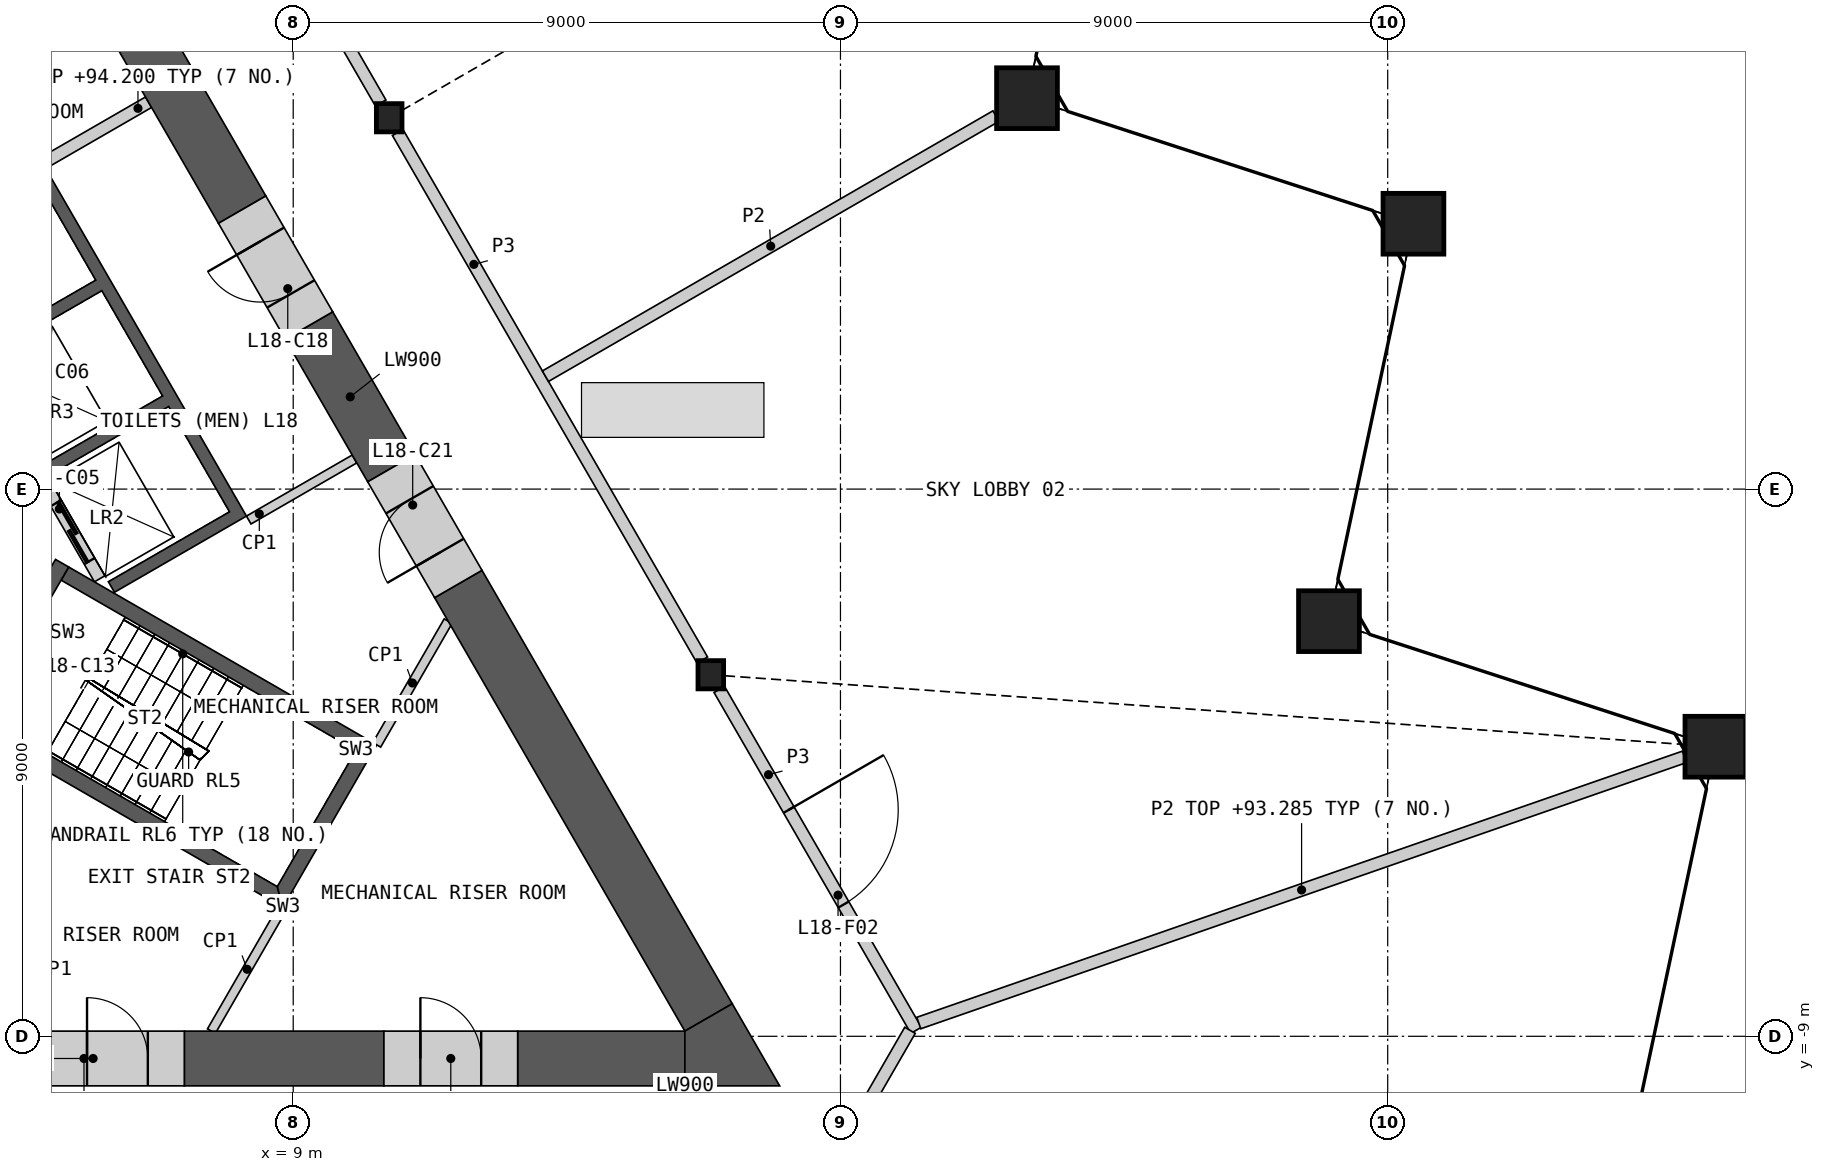
"""IFC4 building model, lengths in metres.
Left out: names, types, materials, properties, quantities, classifications, styles, units other than length and angle.
Written with IfcOpenShell. Run it as: python <this file> out.ifc"""

import sys

from ifc_helpers import new_model, si_unit, direction, frame, frame_2d, origin, origin_2d, place, context, subcontext, project, spatial, polyline, rectangle, hollow_rectangle, i_section, outline, extrude, element, fill, save


model = new_model("IFC4")
c1 = context("Model", 3, precision=1e-05, world=origin(), true_north=direction((0.0, 1.0)))
c2 = subcontext(c1, "Body", "Model", "MODEL_VIEW")
j1 = project(units=[si_unit("LENGTHUNIT", "METRE"), si_unit("PLANEANGLEUNIT", "RADIAN")], contexts=[c1])
p1 = place(None, origin())
s1 = spatial("IfcSite", under=j1, at=p1, CompositionType="ELEMENT")
p2 = place(p1, origin())
s2 = spatial("IfcBuilding", under=s1, at=p2, CompositionType="ELEMENT")
p3 = place(p2, frame((0.0, 0.0, 84.6)))
s3 = spatial("IfcBuildingStorey", under=s2, at=p3, CompositionType="ELEMENT", Elevation=84.6)
for number, where, z_axis, x_axis in (
    (1, (32.389, -4.237, 0.0), (0.0, 0.0, 1.0), (1.0, 0.0, 0.0)),
    (2, (26.034, -2.172, 0.0), (0.0, 0.0, 1.0), (1.0, 0.0, 0.0)),
    (3, (27.423, 4.364, 0.0), (0.0, 0.0, 1.0), (1.0, 0.0, 0.0)),
    (4, (21.068, 6.429, 0.0), (0.0, 0.0, 1.0), (1.0, 0.0, 0.0)),
):
    element("IfcColumn", number, at=place(p3, frame(where, z_axis=z_axis, x_axis=x_axis)), inside=s3, PredefinedType="COLUMN", context=c2, shape_type="SweptSolid", body=[
        extrude(hollow_rectangle(XDim=1.0, YDim=1.0, WallThickness=0.07, at=origin_2d()), origin(), (0.0, 0.0, 1.0), 10.0),
    ])
for number, where, z_axis, x_axis in (
    (5, (15.868, -3.054, 0.0), (0.0, 0.0, 1.0), (1.0, 0.0, 0.0)),
    (6, (10.578, 6.107, 0.0), (0.0, 0.0, 1.0), (1.0, 0.0, 0.0)),
):
    element("IfcColumn", number, at=place(p3, frame(where, z_axis=z_axis, x_axis=x_axis)), inside=s3, PredefinedType="COLUMN", context=c2, shape_type="SweptSolid", body=[
        extrude(i_section(OverallWidth=0.421, OverallDepth=0.465, WebThickness=0.045, FlangeThickness=0.072, at=origin_2d()), origin(), (0.0, 0.0, 1.0), 10.0),
    ])
p4 = place(p3, origin())
e7 = element("IfcWall", 7, at=p4, inside=s3, PredefinedType="SHEAR", context=c2, shape_type="SweptSolid", body=[
    extrude(outline(polyline([(2.66, 4.192), (4.831, 5.445), (8.231, -0.444), (6.061, -1.697), (5.96, -1.524), (7.952, -0.374), (6.952, 1.358), (4.96, 0.208), (4.861, 0.381), (6.852, 1.531), (5.852, 3.263), (3.861, 2.113), (3.76, 2.287), (5.752, 3.437), (4.752, 5.169), (2.76, 4.019), (2.66, 4.192)])), origin(), (0.0, 0.0, 1.0), 9.6),
])
p5 = place(p3, frame((5.817, -1.476, 0.0), z_axis=(0.0, 0.0, 1.0), x_axis=(-0.500002616675, 0.866023893041, 0.0)))
e8 = element("IfcWall", 8, at=p5, inside=s3, PredefinedType="SOLIDWALL", context=c2, shape_type="SweptSolid", body=[
    extrude(rectangle(XDim=8.373, YDim=0.2, at=frame_2d((4.187, 0.0))), origin(), (0.0, 0.0, 1.0), 9.6),
])
p6 = place(p5, frame((0.337, 0.0, 0.0)))
e9 = element("IfcOpeningElement", 9, at=p6, cuts=e8, PredefinedType="OPENING", context=c2, shape_type="SweptSolid", body=[
    extrude(rectangle(XDim=1.1, YDim=2.1, at=frame_2d((0.55, 1.05))), frame((0.0, 0.11, 0.0), z_axis=(0.0, -1.0, 0.0), x_axis=(1.0, 0.0, 0.0)), (0.0, 0.0, 1.0), 0.22),
])
p7 = place(p5, frame((2.537, 0.0, 0.0)))
e10 = element("IfcOpeningElement", 10, at=p7, cuts=e8, PredefinedType="OPENING", context=c2, shape_type="SweptSolid", body=[
    extrude(rectangle(XDim=1.1, YDim=2.1, at=frame_2d((0.55, 1.05))), frame((0.0, 0.11, 0.0), z_axis=(0.0, -1.0, 0.0), x_axis=(1.0, 0.0, 0.0)), (0.0, 0.0, 1.0), 0.22),
])
p8 = place(p5, frame((4.737, 0.0, 0.0)))
e11 = element("IfcOpeningElement", 11, at=p8, cuts=e8, PredefinedType="OPENING", context=c2, shape_type="SweptSolid", body=[
    extrude(rectangle(XDim=1.1, YDim=2.1, at=frame_2d((0.55, 1.05))), frame((0.0, 0.11, 0.0), z_axis=(0.0, -1.0, 0.0), x_axis=(1.0, 0.0, 0.0)), (0.0, 0.0, 1.0), 0.22),
])
p9 = place(p5, frame((7.037, 0.0, 0.0)))
e12 = element("IfcOpeningElement", 12, at=p9, cuts=e8, PredefinedType="OPENING", context=c2, shape_type="SweptSolid", body=[
    extrude(rectangle(XDim=0.9, YDim=2.1, at=frame_2d((0.45, 1.05))), frame((0.0, 0.11, 0.0), z_axis=(0.0, -1.0, 0.0), x_axis=(1.0, 0.0, 0.0)), (0.0, 0.0, 1.0), 0.22),
])
p10 = place(p3, frame((4.881, 5.358, 0.0), z_axis=(0.0, 0.0, 1.0), x_axis=(0.866035824272, 0.499981950752, 0.0)))
e13 = element("IfcWall", 13, at=p10, inside=s3, PredefinedType="SHEAR", context=c2, shape_type="SweptSolid", body=[
    extrude(rectangle(XDim=2.009, YDim=0.2, at=frame_2d((1.004, 0.0))), origin(), (0.0, 0.0, 1.0), 9.6),
])
p11 = place(p3, frame((3.781, 7.263, 0.0), z_axis=(0.0, 0.0, 1.0), x_axis=(0.865983199114, 0.50007309351, 0.0)))
e14 = element("IfcWall", 14, at=p11, inside=s3, PredefinedType="SHEAR", context=c2, shape_type="SweptSolid", body=[
    extrude(rectangle(XDim=2.009, YDim=0.2, at=frame_2d((1.004, 0.0))), origin(), (0.0, 0.0, 1.0), 9.6),
])
p12 = place(p3, origin())
e15 = element("IfcWall", 15, at=p12, inside=s3, PredefinedType="SHEAR", context=c2, shape_type="SweptSolid", body=[
    extrude(outline(polyline([(3.763, -3.956), (8.83, -6.881), (8.738, -6.539), (3.888, -3.739), (3.763, -3.956)])), origin(), (0.0, 0.0, 1.0), 9.6),
])
p13 = place(p3, origin())
e16 = element("IfcWall", 16, at=p13, inside=s3, PredefinedType="SHEAR", context=c2, shape_type="SweptSolid", body=[
    extrude(outline(polyline([(8.83, -6.881), (10.374, -4.206), (10.032, -4.298), (8.738, -6.539), (8.83, -6.881)])), origin(), (0.0, 0.0, 1.0), 9.6),
])
p14 = place(p3, origin())
e17 = element("IfcWall", 17, at=p14, inside=s3, PredefinedType="SHEAR", context=c2, shape_type="SweptSolid", body=[
    extrude(outline(polyline([(10.032, -4.298), (10.374, -4.206), (5.307, -1.281), (5.182, -1.498), (10.032, -4.298)])), origin(), (0.0, 0.0, 1.0), 9.6),
])
p15 = place(p3, frame((3.655, -3.893, 0.0), z_axis=(0.0, 0.0, 1.0), x_axis=(0.499982516597, 0.866035497597, 0.0)))
e18 = element("IfcWall", 18, at=p15, inside=s3, PredefinedType="SHEAR", context=c2, shape_type="SweptSolid", body=[
    extrude(rectangle(XDim=3.088, YDim=0.25, at=frame_2d((1.544, 0.0))), origin(), (0.0, 0.0, 1.0), 9.6),
])
p16 = place(p15, frame((0.994, 0.0, 0.0)))
e19 = element("IfcOpeningElement", 19, at=p16, cuts=e18, PredefinedType="OPENING", context=c2, shape_type="SweptSolid", body=[
    extrude(rectangle(XDim=1.1, YDim=2.1, at=frame_2d((0.55, 1.05))), frame((0.0, 0.135, 0.0), z_axis=(0.0, -1.0, 0.0), x_axis=(1.0, 0.0, 0.0)), (0.0, 0.0, 1.0), 0.27),
])
p17 = place(p3, frame((8.268, -0.509, 0.0), z_axis=(0.0, 0.0, 1.0), x_axis=(0.866035824272, 0.499981950752, 0.0)))
e20 = element("IfcWall", 20, at=p17, inside=s3, PredefinedType="PARTITIONING", context=c2, shape_type="SweptSolid", body=[
    extrude(rectangle(XDim=2.009, YDim=0.15, at=frame_2d((1.004, 0.0))), origin(), (0.0, 0.0, 1.0), 9.6),
])
p18 = place(p3, frame((8.83, -6.881, 0.0), z_axis=(0.0, 0.0, 1.0), x_axis=(-0.500073279432, -0.865983091751, 0.0)))
e21 = element("IfcWall", 21, at=p18, inside=s3, PredefinedType="PARTITIONING", context=c2, shape_type="SweptSolid", body=[
    extrude(rectangle(XDim=2.349, YDim=0.15, at=frame_2d((1.175, 0.0))), origin(), (0.0, 0.0, 1.0), 9.6),
])
p19 = place(p3, frame((10.374, -4.206, 0.0), z_axis=(0.0, 0.0, 1.0), x_axis=(0.499995339376, 0.86602809458, 0.0)))
e22 = element("IfcWall", 22, at=p19, inside=s3, PredefinedType="PARTITIONING", context=c2, shape_type="SweptSolid", body=[
    extrude(rectangle(XDim=2.349, YDim=0.15, at=frame_2d((1.175, 0.0))), origin(), (0.0, 0.0, 1.0), 9.6),
])
p20 = place(p3, frame((7.209, -9.365, 0.0), z_axis=(0.0, 0.0, 1.0), x_axis=(1.0, 0.0, 0.0)))
e23 = element("IfcWall", 23, at=p20, inside=s3, PredefinedType="SHEAR", context=c2, shape_type="SweptSolid", body=[
    extrude(rectangle(XDim=3.282, YDim=0.9, at=frame_2d((1.641, 0.0))), origin(), (0.0, 0.0, 1.0), 9.6),
])
p21 = place(p3, frame((12.691, -9.365, 0.0), z_axis=(0.0, 0.0, 1.0), x_axis=(1.0, 0.0, 0.0)))
e24 = element("IfcWall", 24, at=p21, inside=s3, PredefinedType="SHEAR", context=c2, shape_type="SweptSolid", body=[
    extrude(rectangle(XDim=2.75, YDim=0.9, at=frame_2d((1.375, 0.0))), origin(), (0.0, 0.0, 1.0), 9.6),
])
p22 = place(p3, frame((8.16, 4.596, 0.0), z_axis=(0.0, 0.0, 1.0), x_axis=(-0.500009830349, 0.866019728156, 0.0)))
e25 = element("IfcWall", 25, at=p22, inside=s3, PredefinedType="SHEAR", context=c2, shape_type="SweptSolid", body=[
    extrude(rectangle(XDim=15.541, YDim=0.9, at=frame_2d((7.771, 0.0))), origin(), (0.0, 0.0, 1.0), 9.6),
])
p23 = place(p3, frame((15.831, -8.69, 0.0), z_axis=(0.0, 0.0, 1.0), x_axis=(-0.499995435471, 0.8660280391, 0.0)))
e26 = element("IfcWall", 26, at=p23, inside=s3, PredefinedType="SHEAR", context=c2, shape_type="SweptSolid", body=[
    extrude(rectangle(XDim=8.232, YDim=0.9, at=frame_2d((4.116, 0.0))), origin(), (0.0, 0.0, 1.0), 9.6),
])
p24 = place(p3, frame((10.615, 0.344, 0.0), z_axis=(0.0, 0.0, 1.0), x_axis=(-0.500044870432, 0.865999496279, 0.0)))
e27 = element("IfcWall", 27, at=p24, inside=s3, PredefinedType="SHEAR", context=c2, shape_type="SweptSolid", body=[
    extrude(rectangle(XDim=2.709, YDim=0.9, at=frame_2d((1.354, 0.0))), origin(), (0.0, 0.0, 1.0), 9.6),
])
p25 = place(p3, origin())
e28 = element("IfcWall", 28, at=p25, inside=s3, PredefinedType="SHEAR", context=c2, shape_type="SweptSolid", body=[
    extrude(outline(polyline([(15.441, -9.815), (15.441, -8.915), (16.221, -8.465), (17.0, -9.815), (15.441, -9.815)])), origin(), (0.0, 0.0, 1.0), 9.6),
])
p26 = place(p3, frame((10.491, -9.365, 0.0), z_axis=(0.0, 0.0, 1.0), x_axis=(1.0, 0.0, 0.0)))
e29 = element("IfcWall", 29, at=p26, inside=s3, PredefinedType="SHEAR", context=c2, shape_type="SweptSolid", body=[
    extrude(rectangle(XDim=2.2, YDim=0.9, at=frame_2d((1.1, 0.0))), origin(), (0.0, 0.0, 1.0), 9.6),
])
p27 = place(p26, frame((0.6, 0.0, 0.0)))
e30 = element("IfcOpeningElement", 30, at=p27, cuts=e29, PredefinedType="OPENING", context=c2, shape_type="SweptSolid", body=[
    extrude(rectangle(XDim=1.0, YDim=2.1, at=frame_2d((0.5, 1.05))), frame((0.0, 0.46, 0.0), z_axis=(0.0, -1.0, 0.0), x_axis=(1.0, 0.0, 0.0)), (0.0, 0.0, 1.0), 0.92),
])
p28 = place(p3, frame((9.26, 2.691, 0.0), z_axis=(0.0, 0.0, 1.0), x_axis=(-0.499946605688, 0.86605622881, 0.0)))
e31 = element("IfcWall", 31, at=p28, inside=s3, PredefinedType="SHEAR", context=c2, shape_type="SweptSolid", body=[
    extrude(rectangle(XDim=2.2, YDim=0.9, at=frame_2d((1.1, 0.0))), origin(), (0.0, 0.0, 1.0), 9.6),
])
p29 = place(p28, frame((0.6, 0.0, 0.0)))
e32 = element("IfcOpeningElement", 32, at=p29, cuts=e31, PredefinedType="OPENING", context=c2, shape_type="SweptSolid", body=[
    extrude(rectangle(XDim=1.0, YDim=2.1, at=frame_2d((0.5, 1.05))), frame((0.0, 0.46, 0.0), z_axis=(0.0, -1.0, 0.0), x_axis=(1.0, 0.0, 0.0)), (0.0, 0.0, 1.0), 0.92),
])
p30 = place(p3, frame((11.715, -1.561, 0.0), z_axis=(0.0, 0.0, 1.0), x_axis=(-0.499946605688, 0.86605622881, 0.0)))
e33 = element("IfcWall", 33, at=p30, inside=s3, PredefinedType="SHEAR", context=c2, shape_type="SweptSolid", body=[
    extrude(rectangle(XDim=2.2, YDim=0.9, at=frame_2d((1.1, 0.0))), origin(), (0.0, 0.0, 1.0), 9.6),
])
p31 = place(p30, frame((0.6, 0.0, 0.0)))
e34 = element("IfcOpeningElement", 34, at=p31, cuts=e33, PredefinedType="OPENING", context=c2, shape_type="SweptSolid", body=[
    extrude(rectangle(XDim=1.0, YDim=2.1, at=frame_2d((0.5, 1.05))), frame((0.0, 0.46, 0.0), z_axis=(0.0, -1.0, 0.0), x_axis=(1.0, 0.0, 0.0)), (0.0, 0.0, 1.0), 0.92),
])
p32 = place(p3, frame((5.009, -9.365, 0.0), z_axis=(0.0, 0.0, 1.0), x_axis=(1.0, 0.0, 0.0)))
e35 = element("IfcWall", 35, at=p32, inside=s3, PredefinedType="SHEAR", context=c2, shape_type="SweptSolid", body=[
    extrude(rectangle(XDim=2.2, YDim=0.9, at=frame_2d((1.1, 0.0))), origin(), (0.0, 0.0, 1.0), 9.6),
])
p33 = place(p32, frame((0.6, 0.0, 0.0)))
e36 = element("IfcOpeningElement", 36, at=p33, cuts=e35, PredefinedType="OPENING", context=c2, shape_type="SweptSolid", body=[
    extrude(rectangle(XDim=1.0, YDim=2.1, at=frame_2d((0.5, 1.05))), frame((0.0, 0.46, 0.0), z_axis=(0.0, -1.0, 0.0), x_axis=(1.0, 0.0, 0.0)), (0.0, 0.0, 1.0), 0.92),
])
p34 = place(p3, frame((10.719, 5.865, 0.0), z_axis=(0.0, 0.0, 1.0), x_axis=(0.49999175339, -0.866030164915, 0.0)))
e37 = element("IfcWall", 37, at=p34, inside=s3, PredefinedType="PARTITIONING", context=c2, shape_type="SweptSolid", body=[
    extrude(rectangle(XDim=10.019, YDim=0.2, at=frame_2d((5.009, 0.0))), origin(), (0.0, 0.0, 1.0), 9.6),
])
p35 = place(p3, frame((5.429, 15.026, 0.0), z_axis=(0.0, 0.0, 1.0), x_axis=(0.50001002959, -0.86601961312, 0.0)))
e38 = element("IfcWall", 38, at=p35, inside=s3, PredefinedType="PARTITIONING", context=c2, shape_type="SweptSolid", body=[
    extrude(rectangle(XDim=10.019, YDim=0.2, at=frame_2d((5.009, 0.0))), origin(), (0.0, 0.0, 1.0), 9.6),
])
p36 = place(p35, frame((4.059, 0.0, 0.0)))
e39 = element("IfcOpeningElement", 39, at=p36, cuts=e38, PredefinedType="OPENING", context=c2, shape_type="SweptSolid", body=[
    extrude(rectangle(XDim=1.8, YDim=2.1, at=frame_2d((0.9, 1.05))), frame((0.0, 0.11, 0.0), z_axis=(0.0, -1.0, 0.0), x_axis=(1.0, 0.0, 0.0)), (0.0, 0.0, 1.0), 0.22),
])
p37 = place(p3, frame((16.008, -3.296, 0.0), z_axis=(0.0, 0.0, 1.0), x_axis=(0.499984737558, -0.86603421538, 0.0)))
e40 = element("IfcWall", 40, at=p37, inside=s3, PredefinedType="PARTITIONING", context=c2, shape_type="SweptSolid", body=[
    extrude(rectangle(XDim=6.473, YDim=0.2, at=frame_2d((3.236, 0.0))), origin(), (0.0, 0.0, 1.0), 9.6),
])
p38 = place(p37, frame((2.285, 0.0, 0.0)))
e41 = element("IfcOpeningElement", 41, at=p38, cuts=e40, PredefinedType="OPENING", context=c2, shape_type="SweptSolid", body=[
    extrude(rectangle(XDim=1.8, YDim=2.1, at=frame_2d((0.9, 1.05))), frame((0.0, 0.11, 0.0), z_axis=(0.0, -1.0, 0.0), x_axis=(1.0, 0.0, 0.0)), (0.0, 0.0, 1.0), 0.22),
])
p39 = place(p3, frame((17.281, -12.128, 0.0), z_axis=(0.0, 0.0, 1.0), x_axis=(0.499958791762, 0.866049194065, 0.0)))
e42 = element("IfcWall", 42, at=p39, inside=s3, PredefinedType="PARTITIONING", context=c2, shape_type="SweptSolid", body=[
    extrude(rectangle(XDim=3.726, YDim=0.2, at=frame_2d((1.863, 0.0))), origin(), (0.0, 0.0, 1.0), 9.6),
])
p40 = place(p3, frame((19.288, -8.782, 0.0), z_axis=(0.0, 0.0, 1.0), x_axis=(0.944544719933, 0.328382813263, 0.0)))
e43 = element("IfcWall", 43, at=p40, inside=s3, PredefinedType="PARTITIONING", context=c2, shape_type="SweptSolid", body=[
    extrude(rectangle(XDim=13.33, YDim=0.2, at=frame_2d((6.665, 0.0))), origin(), (0.0, 0.0, 1.0), 8.685),
])
p41 = place(p3, frame((13.148, 1.857, 0.0), z_axis=(0.0, 0.0, 1.0), x_axis=(0.86602022259, 0.500008973985, 0.0)))
e44 = element("IfcWall", 44, at=p41, inside=s3, PredefinedType="PARTITIONING", context=c2, shape_type="SweptSolid", body=[
    extrude(rectangle(XDim=8.556, YDim=0.2, at=frame_2d((4.278, 0.0))), origin(), (0.0, 0.0, 1.0), 8.685),
])
p42 = place(p6, origin())
e45 = element("IfcDoor", 45, at=p42, inside=s3, OperationType="SLIDING_TO_LEFT", PredefinedType="DOOR", context=c2, shape_type="SweptSolid", body=[
    extrude(rectangle(XDim=1.1, YDim=2.1, at=frame_2d((0.55, 1.05))), frame((0.0, 0.025, 0.0), z_axis=(0.0, -1.0, 0.0), x_axis=(1.0, 0.0, 0.0)), (0.0, 0.0, 1.0), 0.05),
])
fill(e9, e45)
p43 = place(p27, origin())
e46 = element("IfcDoor", 46, at=p43, inside=s3, OperationType="SINGLE_SWING_LEFT", PredefinedType="DOOR", context=c2, shape_type="SweptSolid", body=[
    extrude(rectangle(XDim=1.0, YDim=2.1, at=frame_2d((0.5, 1.05))), frame((0.0, 0.205, 0.0), z_axis=(0.0, -1.0, 0.0), x_axis=(1.0, 0.0, 0.0)), (0.0, 0.0, 1.0), 0.05),
])
fill(e30, e46)
p44 = place(p29, origin())
e47 = element("IfcDoor", 47, at=p44, inside=s3, OperationType="SINGLE_SWING_RIGHT", PredefinedType="DOOR", context=c2, shape_type="SweptSolid", body=[
    extrude(rectangle(XDim=1.0, YDim=2.1, at=frame_2d((0.5, 1.05))), frame((0.0, 0.205, 0.0), z_axis=(0.0, -1.0, 0.0), x_axis=(1.0, 0.0, 0.0)), (0.0, 0.0, 1.0), 0.05),
])
fill(e32, e47)
p45 = place(p31, origin())
e48 = element("IfcDoor", 48, at=p45, inside=s3, OperationType="SINGLE_SWING_LEFT", PredefinedType="DOOR", context=c2, shape_type="SweptSolid", body=[
    extrude(rectangle(XDim=1.0, YDim=2.1, at=frame_2d((0.5, 1.05))), frame((0.0, 0.205, 0.0), z_axis=(0.0, -1.0, 0.0), x_axis=(1.0, 0.0, 0.0)), (0.0, 0.0, 1.0), 0.05),
])
fill(e34, e48)
p46 = place(p33, origin())
e49 = element("IfcDoor", 49, at=p46, inside=s3, OperationType="SINGLE_SWING_LEFT", PredefinedType="DOOR", context=c2, shape_type="SweptSolid", body=[
    extrude(rectangle(XDim=1.0, YDim=2.1, at=frame_2d((0.5, 1.05))), frame((0.0, 0.205, 0.0), z_axis=(0.0, -1.0, 0.0), x_axis=(1.0, 0.0, 0.0)), (0.0, 0.0, 1.0), 0.05),
])
fill(e36, e49)
p47 = place(p38, origin())
e50 = element("IfcDoor", 50, at=p47, inside=s3, OperationType="DOUBLE_DOOR_SINGLE_SWING", PredefinedType="DOOR", context=c2, shape_type="SweptSolid", body=[
    extrude(rectangle(XDim=1.8, YDim=2.1, at=frame_2d((0.9, 1.05))), frame((0.0, 0.025, 0.0), z_axis=(0.0, -1.0, 0.0), x_axis=(1.0, 0.0, 0.0)), (0.0, 0.0, 1.0), 0.05),
])
fill(e41, e50)
save(model, sys.argv[1])
